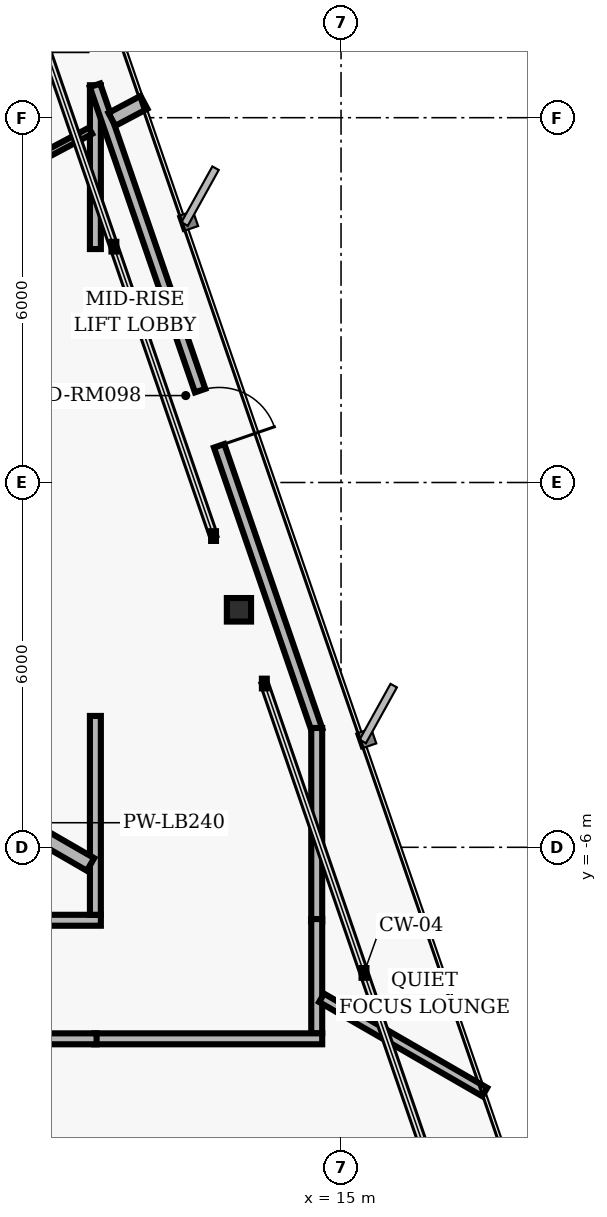
"""IFC4 building model, lengths in metres.
Left out: names, types, materials, properties, quantities, classifications, styles, units other than length and angle.
Written with IfcOpenShell. Run it as: python <this file> out.ifc"""

import sys

from ifc_helpers import new_model, si_unit, direction, frame, frame_2d, origin, origin_2d, place, context, subcontext, project, spatial, rectangle, i_section, extrude, element, fill, save


model = new_model("IFC4")
c1 = context("Model", 3, precision=1e-05, world=origin(), true_north=direction((0.0, 1.0)))
c2 = subcontext(c1, "Body", "Model", "MODEL_VIEW")
j1 = project(units=[si_unit("LENGTHUNIT", "METRE"), si_unit("PLANEANGLEUNIT", "RADIAN")], contexts=[c1])
p1 = place(None, origin())
s1 = spatial("IfcSite", under=j1, at=p1, CompositionType="ELEMENT")
p2 = place(p1, origin())
s2 = spatial("IfcBuilding", under=s1, at=p2, CompositionType="ELEMENT")
p3 = place(p2, frame((0.0, 0.0, 165.44)))
s3 = spatial("IfcBuildingStorey", under=s2, at=p3, CompositionType="ELEMENT", Elevation=165.44)
p4 = place(p3, frame((13.321, -2.094, 0.0), z_axis=(0.0, 0.0, 1.0), x_axis=(1.0, 0.0, 0.0)))
e1 = element("IfcColumn", 1, at=p4, inside=s3, PredefinedType="COLUMN", context=c2, shape_type="SweptSolid", body=[
    extrude(i_section(OverallWidth=0.398, OverallDepth=0.387, WebThickness=0.021, FlangeThickness=0.033, FilletRadius=0.018, at=origin_2d()), origin(), (0.0, 0.0, 1.0), 3.04),
])
p5 = place(p3, frame((5.53, -7.2, 0.0), z_axis=(0.0, 0.0, 1.0), x_axis=(1.0, 0.0, 0.0)))
e2 = element("IfcWall", 2, at=p5, inside=s3, PredefinedType="PARTITIONING", context=c2, shape_type="SweptSolid", body=[
    extrude(rectangle(XDim=5.52, YDim=0.18, at=frame_2d((2.76, 0.0))), origin(), (0.0, 0.0, 1.0), 2.33),
])
p6 = place(p5, frame((2.25, 0.0, 0.0)))
e3 = element("IfcOpeningElement", 3, at=p6, cuts=e2, PredefinedType="OPENING", context=c2, shape_type="SweptSolid", body=[
    extrude(rectangle(XDim=1.02, YDim=2.02, at=frame_2d((0.51, 1.01))), frame((0.0, 0.1, 0.0), z_axis=(0.0, -1.0, 0.0), x_axis=(1.0, 0.0, 0.0)), (0.0, 0.0, 1.0), 0.2),
])
p7 = place(p3, frame((10.96, -7.11, 0.0), z_axis=(0.0, 0.0, 1.0), x_axis=(0.0, 1.0, 0.0)))
e4 = element("IfcWall", 4, at=p7, inside=s3, PredefinedType="PARTITIONING", context=c2, shape_type="SweptSolid", body=[
    extrude(rectangle(XDim=3.271, YDim=0.18, at=frame_2d((1.635, 0.0))), origin(), (0.0, 0.0, 1.0), 2.763),
])
p8 = place(p3, frame((10.96, 3.84, 0.0), z_axis=(0.0, 0.0, 1.0), x_axis=(0.0, 1.0, 0.0)))
e5 = element("IfcWall", 5, at=p8, inside=s3, PredefinedType="PARTITIONING", context=c2, shape_type="SweptSolid", body=[
    extrude(rectangle(XDim=2.694, YDim=0.18, at=frame_2d((1.347, 0.0))), origin(), (0.0, 0.0, 1.0), 2.33),
])
p9 = place(p3, frame((10.954, 6.533, 0.0), z_axis=(0.0, 0.0, 1.0), x_axis=(0.325553439946, -0.945523642084, 0.0)))
e6 = element("IfcWall", 6, at=p9, inside=s3, PredefinedType="PARTITIONING", context=c2, shape_type="SweptSolid", body=[
    extrude(rectangle(XDim=11.22, YDim=0.18, at=frame_2d((5.61, 0.0))), origin(), (0.0, 0.0, 1.0), 2.763),
])
p10 = place(p9, frame((5.311, 0.0, 0.0)))
e7 = element("IfcOpeningElement", 7, at=p10, cuts=e6, PredefinedType="OPENING", context=c2, shape_type="SweptSolid", body=[
    extrude(rectangle(XDim=0.96, YDim=2.02, at=frame_2d((0.48, 1.01))), frame((0.0, 0.1, 0.0), z_axis=(0.0, -1.0, 0.0), x_axis=(1.0, 0.0, 0.0)), (0.0, 0.0, 1.0), 0.2),
])
p11 = place(p3, frame((14.6, -4.038, 0.0), z_axis=(0.0, 0.0, 1.0), x_axis=(0.0, -1.0, 0.0)))
e8 = element("IfcWall", 8, at=p11, inside=s3, PredefinedType="PARTITIONING", context=c2, shape_type="SweptSolid", body=[
    extrude(rectangle(XDim=3.182, YDim=0.18, at=frame_2d((1.591, 0.0))), origin(), (0.0, 0.0, 1.0), 2.763),
])
p12 = place(p3, frame((14.6, -7.18, 0.0), z_axis=(0.0, 0.0, 1.0), x_axis=(0.0, -1.0, 0.0)))
e9 = element("IfcWall", 9, at=p12, inside=s3, PredefinedType="PARTITIONING", context=c2, shape_type="SweptSolid", body=[
    extrude(rectangle(XDim=1.88, YDim=0.18, at=frame_2d((0.94, 0.0))), origin(), (0.0, 0.0, 1.0), 2.763),
])
p13 = place(p3, frame((14.69, -9.15, 0.0), z_axis=(0.0, 0.0, 1.0), x_axis=(-1.0, 0.0, 0.0)))
e10 = element("IfcWall", 10, at=p13, inside=s3, PredefinedType="PARTITIONING", context=c2, shape_type="SweptSolid", body=[
    extrude(rectangle(XDim=3.75, YDim=0.18, at=frame_2d((1.875, 0.0))), origin(), (0.0, 0.0, 1.0), 2.763),
])
p14 = place(p3, frame((10.98, -9.15, 0.0), z_axis=(0.0, 0.0, 1.0), x_axis=(-1.0, 0.0, 0.0)))
e11 = element("IfcWall", 11, at=p14, inside=s3, PredefinedType="PARTITIONING", context=c2, shape_type="SweptSolid", body=[
    extrude(rectangle(XDim=17.5, YDim=0.18, at=frame_2d((8.75, 0.0))), origin(), (0.0, 0.0, 1.0), 2.33),
])
p15 = place(p14, frame((13.791, 0.0, 0.0)))
e12 = element("IfcOpeningElement", 12, at=p15, cuts=e11, PredefinedType="OPENING", context=c2, shape_type="SweptSolid", body=[
    extrude(rectangle(XDim=0.96, YDim=2.02, at=frame_2d((0.48, 1.01))), frame((0.0, 0.1, 0.0), z_axis=(0.0, -1.0, 0.0), x_axis=(1.0, 0.0, 0.0)), (0.0, 0.0, 1.0), 0.2),
])
p16 = place(p14, frame((5.302, 0.0, 0.0)))
e13 = element("IfcOpeningElement", 13, at=p16, cuts=e11, PredefinedType="OPENING", context=c2, shape_type="SweptSolid", body=[
    extrude(rectangle(XDim=0.96, YDim=2.02, at=frame_2d((0.48, 1.01))), frame((0.0, 0.1, 0.0), z_axis=(0.0, -1.0, 0.0), x_axis=(1.0, 0.0, 0.0)), (0.0, 0.0, 1.0), 0.2),
])
p17 = place(p3, frame((8.504, -4.91, 0.0), z_axis=(0.0, 0.0, 1.0), x_axis=(0.866010685746, -0.500025491523, 0.0)))
e14 = element("IfcWall", 14, at=p17, inside=s3, PredefinedType="PARTITIONING", context=c2, shape_type="SweptSolid", body=[
    extrude(rectangle(XDim=2.743, YDim=0.24, at=frame_2d((1.372, 0.0))), origin(), (0.0, 0.0, 1.0), 2.763),
])
p18 = place(p3, frame((14.68, -8.476, 0.0), z_axis=(0.0, 0.0, 1.0), x_axis=(0.866047813034, -0.499961184032, 0.0)))
e15 = element("IfcWall", 15, at=p18, inside=s3, PredefinedType="PARTITIONING", context=c2, shape_type="SweptSolid", body=[
    extrude(rectangle(XDim=3.098, YDim=0.16, at=frame_2d((1.549, 0.0))), origin(), (0.0, 0.0, 1.0), 2.763),
])
p19 = place(p3, frame((9.234, 4.91, 0.0), z_axis=(0.0, 0.0, 1.0), x_axis=(0.882932473202, 0.46949999762, 0.0)))
e16 = element("IfcWall", 16, at=p19, inside=s3, PredefinedType="MOVABLE", context=c2, shape_type="SweptSolid", body=[
    extrude(rectangle(XDim=1.864, YDim=0.115, at=frame_2d((0.932, 0.0))), origin(), (0.0, 0.0, 1.0), 2.763),
])
p20 = place(p3, frame((11.231, 5.972, 0.0), z_axis=(0.0, 0.0, 1.0), x_axis=(0.882951671469, 0.469463891956, 0.0)))
e17 = element("IfcWall", 17, at=p20, inside=s3, PredefinedType="PARTITIONING", context=c2, shape_type="SweptSolid", body=[
    extrude(rectangle(XDim=0.597, YDim=0.24, at=frame_2d((0.299, 0.0))), origin(), (0.0, 0.0, 1.0), 2.763),
])
p21 = place(p10, origin())
e18 = element("IfcDoor", 18, at=p21, inside=s3, OperationType="SINGLE_SWING_RIGHT", PredefinedType="DOOR", context=c2, shape_type="SweptSolid", body=[
    extrude(rectangle(XDim=0.96, YDim=2.02, at=frame_2d((0.48, 1.01))), frame((0.0, 0.025, 0.0), z_axis=(0.0, -1.0, 0.0), x_axis=(1.0, 0.0, 0.0)), (0.0, 0.0, 1.0), 0.05),
])
fill(e7, e18)
save(model, sys.argv[1])
